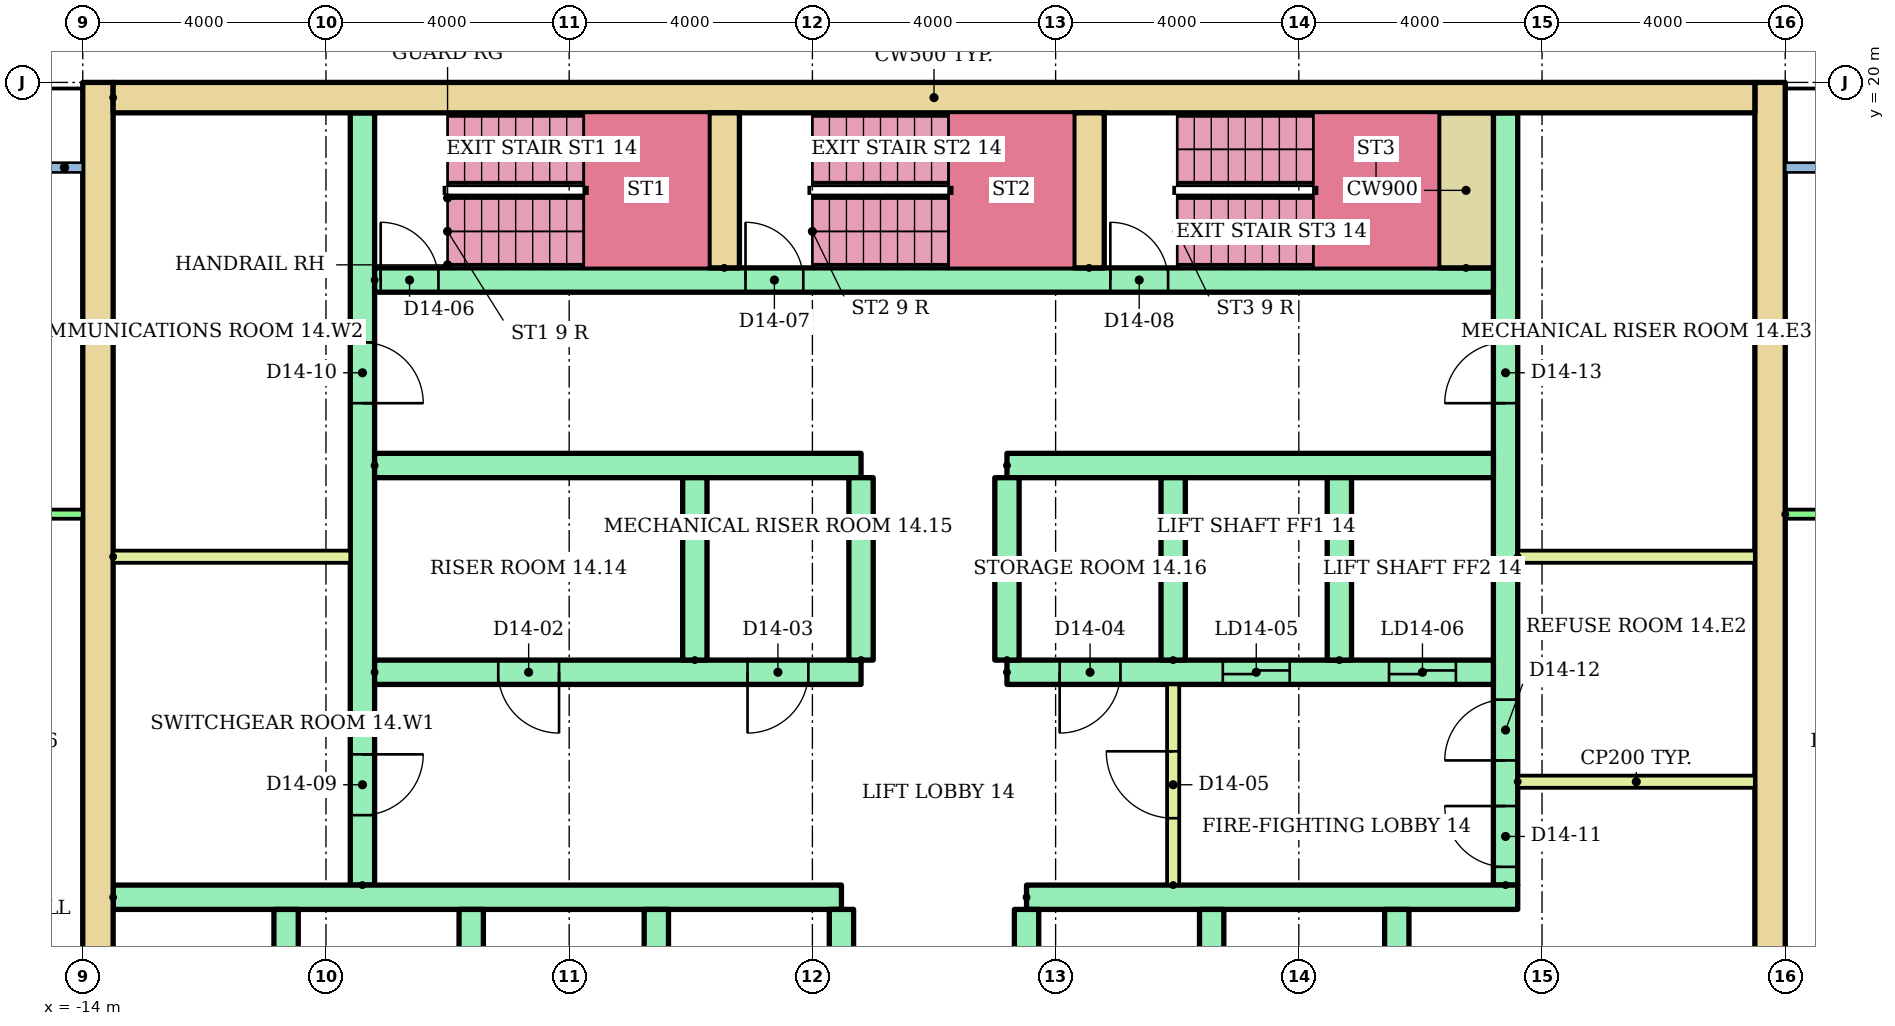
"""IFC4 building model, lengths in metres.
Left out: names, types, materials, properties, quantities, classifications, styles, units other than length and angle.
Written with IfcOpenShell. Run it as: python <this file> out.ifc"""

import sys

from ifc_helpers import new_model, si_unit, direction, frame, frame_2d, origin, place, context, subcontext, project, spatial, rectangle, extrude, element, fill, save


model = new_model("IFC4")
c1 = context("Model", 3, precision=1e-05, world=origin(), true_north=direction((0.0, 1.0)))
c2 = subcontext(c1, "Body", "Model", "MODEL_VIEW")
j1 = project(units=[si_unit("LENGTHUNIT", "METRE"), si_unit("PLANEANGLEUNIT", "RADIAN")], contexts=[c1])
p1 = place(None, origin())
s1 = spatial("IfcSite", under=j1, at=p1, CompositionType="ELEMENT")
p2 = place(p1, origin())
s2 = spatial("IfcBuilding", under=s1, at=p2, CompositionType="ELEMENT")
p3 = place(p2, frame((0.0, 0.0, 54.4)))
s3 = spatial("IfcBuildingStorey", under=s2, at=p3, CompositionType="ELEMENT", Elevation=54.4)
for number, where, z_axis, x_axis in (
    (1, (-13.75, 3.0, 0.0), (0.0, 0.0, 1.0), (0.0, 1.0, 0.0)),
    (2, (13.75, 3.0, 0.0), (0.0, 0.0, 1.0), (0.0, 1.0, 0.0)),
):
    element("IfcWall", number, at=place(p3, frame(where, z_axis=z_axis, x_axis=x_axis)), inside=s3, PredefinedType="SHEAR", context=c2, shape_type="SweptSolid", body=[
        extrude(rectangle(XDim=17.0, YDim=0.5, at=frame_2d((8.5, 0.0))), origin(), (0.0, 0.0, 1.0), 2.92),
    ])
p4 = place(p3, frame((-13.5, 19.75, 0.0)))
e3 = element("IfcWall", 3, at=p4, inside=s3, PredefinedType="SHEAR", context=c2, shape_type="SweptSolid", body=[
    extrude(rectangle(XDim=27.0, YDim=0.5, at=frame_2d((13.5, 0.0))), origin(), (0.0, 0.0, 1.0), 2.92),
])
p5 = place(p3, frame((-9.4, 6.8, 0.0), z_axis=(0.0, 0.0, 1.0), x_axis=(0.0, 1.0, 0.0)))
e4 = element("IfcWall", 4, at=p5, inside=s3, PredefinedType="SHEAR", context=c2, shape_type="SweptSolid", body=[
    extrude(rectangle(XDim=12.7, YDim=0.4, at=frame_2d((6.35, 0.0))), origin(), (0.0, 0.0, 1.0), 2.92),
])
p6 = place(p5, frame((1.15, 0.0, 0.0)))
e5 = element("IfcOpeningElement", 5, at=p6, cuts=e4, PredefinedType="OPENING", context=c2, shape_type="SweptSolid", body=[
    extrude(rectangle(XDim=1.0, YDim=2.1, at=frame_2d((0.5, 1.05))), frame((0.0, 0.21, 0.0), z_axis=(0.0, -1.0, 0.0), x_axis=(1.0, 0.0, 0.0)), (0.0, 0.0, 1.0), 0.42),
])
p7 = place(p5, frame((7.925, 0.0, 0.0)))
e6 = element("IfcOpeningElement", 6, at=p7, cuts=e4, PredefinedType="OPENING", context=c2, shape_type="SweptSolid", body=[
    extrude(rectangle(XDim=1.0, YDim=2.1, at=frame_2d((0.5, 1.05))), frame((0.0, 0.21, 0.0), z_axis=(0.0, -1.0, 0.0), x_axis=(1.0, 0.0, 0.0)), (0.0, 0.0, 1.0), 0.42),
])
p8 = place(p3, frame((9.4, 6.8, 0.0), z_axis=(0.0, 0.0, 1.0), x_axis=(0.0, 1.0, 0.0)))
e7 = element("IfcWall", 7, at=p8, inside=s3, PredefinedType="SHEAR", context=c2, shape_type="SweptSolid", body=[
    extrude(rectangle(XDim=12.7, YDim=0.4, at=frame_2d((6.35, 0.0))), origin(), (0.0, 0.0, 1.0), 2.92),
])
p9 = place(p8, frame((0.3, 0.0, 0.0)))
e8 = element("IfcOpeningElement", 8, at=p9, cuts=e7, PredefinedType="OPENING", context=c2, shape_type="SweptSolid", body=[
    extrude(rectangle(XDim=1.0, YDim=2.1, at=frame_2d((0.5, 1.05))), frame((0.0, 0.21, 0.0), z_axis=(0.0, -1.0, 0.0), x_axis=(1.0, 0.0, 0.0)), (0.0, 0.0, 1.0), 0.42),
])
p10 = place(p8, frame((2.05, 0.0, 0.0)))
e9 = element("IfcOpeningElement", 9, at=p10, cuts=e7, PredefinedType="OPENING", context=c2, shape_type="SweptSolid", body=[
    extrude(rectangle(XDim=1.0, YDim=2.1, at=frame_2d((0.5, 1.05))), frame((0.0, 0.21, 0.0), z_axis=(0.0, -1.0, 0.0), x_axis=(1.0, 0.0, 0.0)), (0.0, 0.0, 1.0), 0.42),
])
p11 = place(p8, frame((7.925, 0.0, 0.0)))
e10 = element("IfcOpeningElement", 10, at=p11, cuts=e7, PredefinedType="OPENING", context=c2, shape_type="SweptSolid", body=[
    extrude(rectangle(XDim=1.0, YDim=2.1, at=frame_2d((0.5, 1.05))), frame((0.0, 0.21, 0.0), z_axis=(0.0, -1.0, 0.0), x_axis=(1.0, 0.0, 0.0)), (0.0, 0.0, 1.0), 0.42),
])
p12 = place(p3, frame((-13.5, 6.6, 0.0)))
e11 = element("IfcWall", 11, at=p12, inside=s3, PredefinedType="SHEAR", context=c2, shape_type="SweptSolid", body=[
    extrude(rectangle(XDim=11.978, YDim=0.4, at=frame_2d((5.989, 0.0))), origin(), (0.0, 0.0, 1.0), 2.92),
])
p13 = place(p3, frame((1.522, 6.6, 0.0)))
e12 = element("IfcWall", 12, at=p13, inside=s3, PredefinedType="SHEAR", context=c2, shape_type="SweptSolid", body=[
    extrude(rectangle(XDim=8.078, YDim=0.4, at=frame_2d((4.039, 0.0))), origin(), (0.0, 0.0, 1.0), 2.92),
])
for number, where, z_axis, x_axis in (
    (13, (-10.656, 3.4, 0.0), (0.0, 0.0, 1.0), (0.0, 1.0, 0.0)),
    (14, (-7.611, 3.4, 0.0), (0.0, 0.0, 1.0), (0.0, 1.0, 0.0)),
    (15, (-4.567, 3.4, 0.0), (0.0, 0.0, 1.0), (0.0, 1.0, 0.0)),
    (16, (-1.522, 3.4, 0.0), (0.0, 0.0, 1.0), (0.0, 1.0, 0.0)),
    (17, (1.522, 3.4, 0.0), (0.0, 0.0, 1.0), (0.0, 1.0, 0.0)),
    (18, (4.567, 3.4, 0.0), (0.0, 0.0, 1.0), (0.0, 1.0, 0.0)),
    (19, (7.611, 3.4, 0.0), (0.0, 0.0, 1.0), (0.0, 1.0, 0.0)),
):
    element("IfcWall", number, at=place(p3, frame(where, z_axis=z_axis, x_axis=x_axis)), inside=s3, PredefinedType="SHEAR", context=c2, shape_type="SweptSolid", body=[
        extrude(rectangle(XDim=3.0, YDim=0.4, at=frame_2d((1.5, 0.0))), origin(), (0.0, 0.0, 1.0), 2.92),
    ])
p14 = place(p3, frame((-9.2, 10.3, 0.0)))
e20 = element("IfcWall", 20, at=p14, inside=s3, PredefinedType="SHEAR", context=c2, shape_type="SweptSolid", body=[
    extrude(rectangle(XDim=8.0, YDim=0.4, at=frame_2d((4.0, 0.0))), origin(), (0.0, 0.0, 1.0), 2.92),
])
p15 = place(p14, frame((2.033, 0.0, 0.0)))
e21 = element("IfcOpeningElement", 21, at=p15, cuts=e20, PredefinedType="OPENING", context=c2, shape_type="SweptSolid", body=[
    extrude(rectangle(XDim=1.0, YDim=2.1, at=frame_2d((0.5, 1.05))), frame((0.0, 0.21, 0.0), z_axis=(0.0, -1.0, 0.0), x_axis=(1.0, 0.0, 0.0)), (0.0, 0.0, 1.0), 0.42),
])
p16 = place(p14, frame((6.133, 0.0, 0.0)))
e22 = element("IfcOpeningElement", 22, at=p16, cuts=e20, PredefinedType="OPENING", context=c2, shape_type="SweptSolid", body=[
    extrude(rectangle(XDim=1.0, YDim=2.1, at=frame_2d((0.5, 1.05))), frame((0.0, 0.21, 0.0), z_axis=(0.0, -1.0, 0.0), x_axis=(1.0, 0.0, 0.0)), (0.0, 0.0, 1.0), 0.42),
])
p17 = place(p3, frame((-9.2, 13.7, 0.0)))
e23 = element("IfcWall", 23, at=p17, inside=s3, PredefinedType="SHEAR", context=c2, shape_type="SweptSolid", body=[
    extrude(rectangle(XDim=8.0, YDim=0.4, at=frame_2d((4.0, 0.0))), origin(), (0.0, 0.0, 1.0), 2.92),
])
p18 = place(p3, frame((1.2, 10.3, 0.0)))
e24 = element("IfcWall", 24, at=p18, inside=s3, PredefinedType="SHEAR", context=c2, shape_type="SweptSolid", body=[
    extrude(rectangle(XDim=8.0, YDim=0.4, at=frame_2d((4.0, 0.0))), origin(), (0.0, 0.0, 1.0), 2.92),
])
p19 = place(p18, frame((3.55, 0.0, 0.0)))
e25 = element("IfcOpeningElement", 25, at=p19, cuts=e24, PredefinedType="OPENING", context=c2, shape_type="SweptSolid", body=[
    extrude(rectangle(XDim=1.1, YDim=2.1, at=frame_2d((0.55, 1.05))), frame((0.0, 0.21, 0.0), z_axis=(0.0, -1.0, 0.0), x_axis=(1.0, 0.0, 0.0)), (0.0, 0.0, 1.0), 0.42),
])
p20 = place(p18, frame((6.283, 0.0, 0.0)))
e26 = element("IfcOpeningElement", 26, at=p20, cuts=e24, PredefinedType="OPENING", context=c2, shape_type="SweptSolid", body=[
    extrude(rectangle(XDim=1.1, YDim=2.1, at=frame_2d((0.55, 1.05))), frame((0.0, 0.21, 0.0), z_axis=(0.0, -1.0, 0.0), x_axis=(1.0, 0.0, 0.0)), (0.0, 0.0, 1.0), 0.42),
])
p21 = place(p18, frame((0.867, 0.0, 0.0)))
e27 = element("IfcOpeningElement", 27, at=p21, cuts=e24, PredefinedType="OPENING", context=c2, shape_type="SweptSolid", body=[
    extrude(rectangle(XDim=1.0, YDim=2.1, at=frame_2d((0.5, 1.05))), frame((0.0, 0.21, 0.0), z_axis=(0.0, -1.0, 0.0), x_axis=(1.0, 0.0, 0.0)), (0.0, 0.0, 1.0), 0.42),
])
p22 = place(p3, frame((1.2, 13.7, 0.0)))
e28 = element("IfcWall", 28, at=p22, inside=s3, PredefinedType="SHEAR", context=c2, shape_type="SweptSolid", body=[
    extrude(rectangle(XDim=8.0, YDim=0.4, at=frame_2d((4.0, 0.0))), origin(), (0.0, 0.0, 1.0), 2.92),
])
for number, where, z_axis, x_axis in (
    (29, (-3.933, 10.5, 0.0), (0.0, 0.0, 1.0), (0.0, 1.0, 0.0)),
    (30, (-1.2, 10.5, 0.0), (0.0, 0.0, 1.0), (0.0, 1.0, 0.0)),
    (31, (1.2, 10.5, 0.0), (0.0, 0.0, 1.0), (0.0, 1.0, 0.0)),
    (32, (3.933, 10.5, 0.0), (0.0, 0.0, 1.0), (0.0, 1.0, 0.0)),
    (33, (6.667, 10.5, 0.0), (0.0, 0.0, 1.0), (0.0, 1.0, 0.0)),
):
    element("IfcWall", number, at=place(p3, frame(where, z_axis=z_axis, x_axis=x_axis)), inside=s3, PredefinedType="SHEAR", context=c2, shape_type="SweptSolid", body=[
        extrude(rectangle(XDim=3.0, YDim=0.4, at=frame_2d((1.5, 0.0))), origin(), (0.0, 0.0, 1.0), 2.92),
    ])
p23 = place(p3, frame((3.933, 6.8, 0.0), z_axis=(0.0, 0.0, 1.0), x_axis=(0.0, 1.0, 0.0)))
e34 = element("IfcWall", 34, at=p23, inside=s3, PredefinedType="PARTITIONING", context=c2, shape_type="SweptSolid", body=[
    extrude(rectangle(XDim=3.3, YDim=0.2, at=frame_2d((1.65, 0.0))), origin(), (0.0, 0.0, 1.0), 2.92),
])
p24 = place(p23, frame((1.1, 0.0, 0.0)))
e35 = element("IfcOpeningElement", 35, at=p24, cuts=e34, PredefinedType="OPENING", context=c2, shape_type="SweptSolid", body=[
    extrude(rectangle(XDim=1.1, YDim=2.1, at=frame_2d((0.55, 1.05))), frame((0.0, 0.11, 0.0), z_axis=(0.0, -1.0, 0.0), x_axis=(1.0, 0.0, 0.0)), (0.0, 0.0, 1.0), 0.22),
])
p25 = place(p3, frame((-9.2, 16.75, 0.0)))
e36 = element("IfcWall", 36, at=p25, inside=s3, PredefinedType="SHEAR", context=c2, shape_type="SweptSolid", body=[
    extrude(rectangle(XDim=18.4, YDim=0.4, at=frame_2d((9.2, 0.0))), origin(), (0.0, 0.0, 1.0), 2.92),
])
p26 = place(p25, frame((0.1, 0.0, 0.0)))
e37 = element("IfcOpeningElement", 37, at=p26, cuts=e36, PredefinedType="OPENING", context=c2, shape_type="SweptSolid", body=[
    extrude(rectangle(XDim=0.95, YDim=2.1, at=frame_2d((0.475, 1.05))), frame((0.0, 0.21, 0.0), z_axis=(0.0, -1.0, 0.0), x_axis=(1.0, 0.0, 0.0)), (0.0, 0.0, 1.0), 0.42),
])
p27 = place(p25, frame((6.1, 0.0, 0.0)))
e38 = element("IfcOpeningElement", 38, at=p27, cuts=e36, PredefinedType="OPENING", context=c2, shape_type="SweptSolid", body=[
    extrude(rectangle(XDim=0.95, YDim=2.1, at=frame_2d((0.475, 1.05))), frame((0.0, 0.21, 0.0), z_axis=(0.0, -1.0, 0.0), x_axis=(1.0, 0.0, 0.0)), (0.0, 0.0, 1.0), 0.42),
])
p28 = place(p25, frame((12.1, 0.0, 0.0)))
e39 = element("IfcOpeningElement", 39, at=p28, cuts=e36, PredefinedType="OPENING", context=c2, shape_type="SweptSolid", body=[
    extrude(rectangle(XDim=0.95, YDim=2.1, at=frame_2d((0.475, 1.05))), frame((0.0, 0.21, 0.0), z_axis=(0.0, -1.0, 0.0), x_axis=(1.0, 0.0, 0.0)), (0.0, 0.0, 1.0), 0.42),
])
for number, where, z_axis, x_axis in (
    (40, (-3.45, 16.95, 0.0), (0.0, 0.0, 1.0), (0.0, 1.0, 0.0)),
    (41, (2.55, 16.95, 0.0), (0.0, 0.0, 1.0), (0.0, 1.0, 0.0)),
):
    element("IfcWall", number, at=place(p3, frame(where, z_axis=z_axis, x_axis=x_axis)), inside=s3, PredefinedType="SHEAR", context=c2, shape_type="SweptSolid", body=[
        extrude(rectangle(XDim=2.55, YDim=0.5, at=frame_2d((1.275, 0.0))), origin(), (0.0, 0.0, 1.0), 2.92),
    ])
p29 = place(p3, frame((8.75, 16.95, 0.0), z_axis=(0.0, 0.0, 1.0), x_axis=(0.0, 1.0, 0.0)))
e42 = element("IfcWall", 42, at=p29, inside=s3, PredefinedType="SHEAR", context=c2, shape_type="SweptSolid", body=[
    extrude(rectangle(XDim=2.55, YDim=0.9, at=frame_2d((1.275, 0.0))), origin(), (0.0, 0.0, 1.0), 2.92),
])
for number, where in (
    (43, (-13.5, 12.2, 0.0)),
    (44, (9.6, 8.5, 0.0)),
    (45, (9.6, 12.2, 0.0)),
):
    element("IfcWall", number, at=place(p3, frame(where)), inside=s3, PredefinedType="PARTITIONING", context=c2, shape_type="SweptSolid", body=[
        extrude(rectangle(XDim=3.9, YDim=0.2, at=frame_2d((1.95, 0.0))), origin(), (0.0, 0.0, 1.0), 2.92),
    ])
p30 = place(p3, frame((-22.0, 12.9, 0.0)))
e46 = element("IfcWall", 46, at=p30, inside=s3, PredefinedType="PARTITIONING", context=c2, shape_type="SweptSolid", body=[
    extrude(rectangle(XDim=8.0, YDim=0.15, at=frame_2d((4.0, 0.0))), origin(), (0.0, 0.0, 1.0), 2.4),
])
p31 = place(p30, frame((3.5, 0.0, 0.0)))
e47 = element("IfcOpeningElement", 47, at=p31, cuts=e46, PredefinedType="OPENING", context=c2, shape_type="SweptSolid", body=[
    extrude(rectangle(XDim=1.0, YDim=2.1, at=frame_2d((0.5, 1.05))), frame((0.0, 0.085, 0.0), z_axis=(0.0, -1.0, 0.0), x_axis=(1.0, 0.0, 0.0)), (0.0, 0.0, 1.0), 0.17),
])
p32 = place(p3, frame((14.0, 12.9, 0.0)))
e48 = element("IfcWall", 48, at=p32, inside=s3, PredefinedType="PARTITIONING", context=c2, shape_type="SweptSolid", body=[
    extrude(rectangle(XDim=22.52, YDim=0.15, at=frame_2d((11.26, 0.0))), origin(), (0.0, 0.0, 1.0), 2.4),
])
p33 = place(p32, frame((5.5, 0.0, 0.0)))
e49 = element("IfcOpeningElement", 49, at=p33, cuts=e48, PredefinedType="OPENING", context=c2, shape_type="SweptSolid", body=[
    extrude(rectangle(XDim=1.0, YDim=2.1, at=frame_2d((0.5, 1.05))), frame((0.0, 0.085, 0.0), z_axis=(0.0, -1.0, 0.0), x_axis=(1.0, 0.0, 0.0)), (0.0, 0.0, 1.0), 0.17),
])
p34 = place(p32, frame((14.45, 0.0, 0.0)))
e50 = element("IfcOpeningElement", 50, at=p34, cuts=e48, PredefinedType="OPENING", context=c2, shape_type="SweptSolid", body=[
    extrude(rectangle(XDim=0.9, YDim=2.1, at=frame_2d((0.45, 1.05))), frame((0.0, 0.085, 0.0), z_axis=(0.0, -1.0, 0.0), x_axis=(1.0, 0.0, 0.0)), (0.0, 0.0, 1.0), 0.17),
])
p35 = place(p32, frame((20.76, 0.0, 0.0)))
e51 = element("IfcOpeningElement", 51, at=p35, cuts=e48, PredefinedType="OPENING", context=c2, shape_type="SweptSolid", body=[
    extrude(rectangle(XDim=0.9, YDim=2.1, at=frame_2d((0.45, 1.05))), frame((0.0, 0.085, 0.0), z_axis=(0.0, -1.0, 0.0), x_axis=(1.0, 0.0, 0.0)), (0.0, 0.0, 1.0), 0.17),
])
p36 = place(p19, origin())
e52 = element("IfcDoor", 52, at=p36, inside=s3, OperationType="SLIDING_TO_LEFT", PredefinedType="DOOR", context=c2, shape_type="SweptSolid", body=[
    extrude(rectangle(XDim=1.1, YDim=2.1, at=frame_2d((0.55, 1.05))), frame((0.0, 0.025, 0.0), z_axis=(0.0, -1.0, 0.0), x_axis=(1.0, 0.0, 0.0)), (0.0, 0.0, 1.0), 0.05),
])
fill(e25, e52)
p37 = place(p20, origin())
e53 = element("IfcDoor", 53, at=p37, inside=s3, OperationType="SLIDING_TO_LEFT", PredefinedType="DOOR", context=c2, shape_type="SweptSolid", body=[
    extrude(rectangle(XDim=1.1, YDim=2.1, at=frame_2d((0.55, 1.05))), frame((0.0, 0.025, 0.0), z_axis=(0.0, -1.0, 0.0), x_axis=(1.0, 0.0, 0.0)), (0.0, 0.0, 1.0), 0.05),
])
fill(e26, e53)
p38 = place(p15, frame((1.0, 0.0, 0.0), z_axis=(0.0, 0.0, 1.0), x_axis=(-1.0, 0.0, 0.0)))
e54 = element("IfcDoor", 54, at=p38, inside=s3, OperationType="SINGLE_SWING_RIGHT", PredefinedType="DOOR", context=c2, shape_type="SweptSolid", body=[
    extrude(rectangle(XDim=1.0, YDim=2.1, at=frame_2d((0.5, 1.05))), frame((0.0, 0.025, 0.0), z_axis=(0.0, -1.0, 0.0), x_axis=(1.0, 0.0, 0.0)), (0.0, 0.0, 1.0), 0.05),
])
fill(e21, e54)
p39 = place(p16, frame((1.0, 0.0, 0.0), z_axis=(0.0, 0.0, 1.0), x_axis=(-1.0, 0.0, 0.0)))
e55 = element("IfcDoor", 55, at=p39, inside=s3, OperationType="SINGLE_SWING_LEFT", PredefinedType="DOOR", context=c2, shape_type="SweptSolid", body=[
    extrude(rectangle(XDim=1.0, YDim=2.1, at=frame_2d((0.5, 1.05))), frame((0.0, 0.025, 0.0), z_axis=(0.0, -1.0, 0.0), x_axis=(1.0, 0.0, 0.0)), (0.0, 0.0, 1.0), 0.05),
])
fill(e22, e55)
p40 = place(p21, frame((1.0, 0.0, 0.0), z_axis=(0.0, 0.0, 1.0), x_axis=(-1.0, 0.0, 0.0)))
e56 = element("IfcDoor", 56, at=p40, inside=s3, OperationType="SINGLE_SWING_LEFT", PredefinedType="DOOR", context=c2, shape_type="SweptSolid", body=[
    extrude(rectangle(XDim=1.0, YDim=2.1, at=frame_2d((0.5, 1.05))), frame((0.0, 0.025, 0.0), z_axis=(0.0, -1.0, 0.0), x_axis=(1.0, 0.0, 0.0)), (0.0, 0.0, 1.0), 0.05),
])
fill(e27, e56)
p41 = place(p24, origin())
e57 = element("IfcDoor", 57, at=p41, inside=s3, OperationType="SINGLE_SWING_RIGHT", PredefinedType="DOOR", context=c2, shape_type="SweptSolid", body=[
    extrude(rectangle(XDim=1.1, YDim=2.1, at=frame_2d((0.55, 1.05))), frame((0.0, 0.025, 0.0), z_axis=(0.0, -1.0, 0.0), x_axis=(1.0, 0.0, 0.0)), (0.0, 0.0, 1.0), 0.05),
])
fill(e35, e57)
p42 = place(p26, origin())
e58 = element("IfcDoor", 58, at=p42, inside=s3, OperationType="SINGLE_SWING_LEFT", PredefinedType="DOOR", context=c2, shape_type="SweptSolid", body=[
    extrude(rectangle(XDim=0.95, YDim=2.1, at=frame_2d((0.475, 1.05))), frame((0.0, 0.025, 0.0), z_axis=(0.0, -1.0, 0.0), x_axis=(1.0, 0.0, 0.0)), (0.0, 0.0, 1.0), 0.05),
])
fill(e37, e58)
p43 = place(p27, origin())
e59 = element("IfcDoor", 59, at=p43, inside=s3, OperationType="SINGLE_SWING_LEFT", PredefinedType="DOOR", context=c2, shape_type="SweptSolid", body=[
    extrude(rectangle(XDim=0.95, YDim=2.1, at=frame_2d((0.475, 1.05))), frame((0.0, 0.025, 0.0), z_axis=(0.0, -1.0, 0.0), x_axis=(1.0, 0.0, 0.0)), (0.0, 0.0, 1.0), 0.05),
])
fill(e38, e59)
p44 = place(p28, origin())
e60 = element("IfcDoor", 60, at=p44, inside=s3, OperationType="SINGLE_SWING_LEFT", PredefinedType="DOOR", context=c2, shape_type="SweptSolid", body=[
    extrude(rectangle(XDim=0.95, YDim=2.1, at=frame_2d((0.475, 1.05))), frame((0.0, 0.025, 0.0), z_axis=(0.0, -1.0, 0.0), x_axis=(1.0, 0.0, 0.0)), (0.0, 0.0, 1.0), 0.05),
])
fill(e39, e60)
p45 = place(p6, frame((1.0, 0.0, 0.0), z_axis=(0.0, 0.0, 1.0), x_axis=(-1.0, 0.0, 0.0)))
e61 = element("IfcDoor", 61, at=p45, inside=s3, OperationType="SINGLE_SWING_RIGHT", PredefinedType="DOOR", context=c2, shape_type="SweptSolid", body=[
    extrude(rectangle(XDim=1.0, YDim=2.1, at=frame_2d((0.5, 1.05))), frame((0.0, 0.025, 0.0), z_axis=(0.0, -1.0, 0.0), x_axis=(1.0, 0.0, 0.0)), (0.0, 0.0, 1.0), 0.05),
])
fill(e5, e61)
p46 = place(p7, frame((1.0, 0.0, 0.0), z_axis=(0.0, 0.0, 1.0), x_axis=(-1.0, 0.0, 0.0)))
e62 = element("IfcDoor", 62, at=p46, inside=s3, OperationType="SINGLE_SWING_LEFT", PredefinedType="DOOR", context=c2, shape_type="SweptSolid", body=[
    extrude(rectangle(XDim=1.0, YDim=2.1, at=frame_2d((0.5, 1.05))), frame((0.0, 0.025, 0.0), z_axis=(0.0, -1.0, 0.0), x_axis=(1.0, 0.0, 0.0)), (0.0, 0.0, 1.0), 0.05),
])
fill(e6, e62)
p47 = place(p9, origin())
e63 = element("IfcDoor", 63, at=p47, inside=s3, OperationType="SINGLE_SWING_RIGHT", PredefinedType="DOOR", context=c2, shape_type="SweptSolid", body=[
    extrude(rectangle(XDim=1.0, YDim=2.1, at=frame_2d((0.5, 1.05))), frame((0.0, 0.025, 0.0), z_axis=(0.0, -1.0, 0.0), x_axis=(1.0, 0.0, 0.0)), (0.0, 0.0, 1.0), 0.05),
])
fill(e8, e63)
p48 = place(p10, origin())
e64 = element("IfcDoor", 64, at=p48, inside=s3, OperationType="SINGLE_SWING_LEFT", PredefinedType="DOOR", context=c2, shape_type="SweptSolid", body=[
    extrude(rectangle(XDim=1.0, YDim=2.1, at=frame_2d((0.5, 1.05))), frame((0.0, 0.025, 0.0), z_axis=(0.0, -1.0, 0.0), x_axis=(1.0, 0.0, 0.0)), (0.0, 0.0, 1.0), 0.05),
])
fill(e9, e64)
p49 = place(p11, origin())
e65 = element("IfcDoor", 65, at=p49, inside=s3, OperationType="SINGLE_SWING_LEFT", PredefinedType="DOOR", context=c2, shape_type="SweptSolid", body=[
    extrude(rectangle(XDim=1.0, YDim=2.1, at=frame_2d((0.5, 1.05))), frame((0.0, 0.025, 0.0), z_axis=(0.0, -1.0, 0.0), x_axis=(1.0, 0.0, 0.0)), (0.0, 0.0, 1.0), 0.05),
])
fill(e10, e65)
save(model, sys.argv[1])
